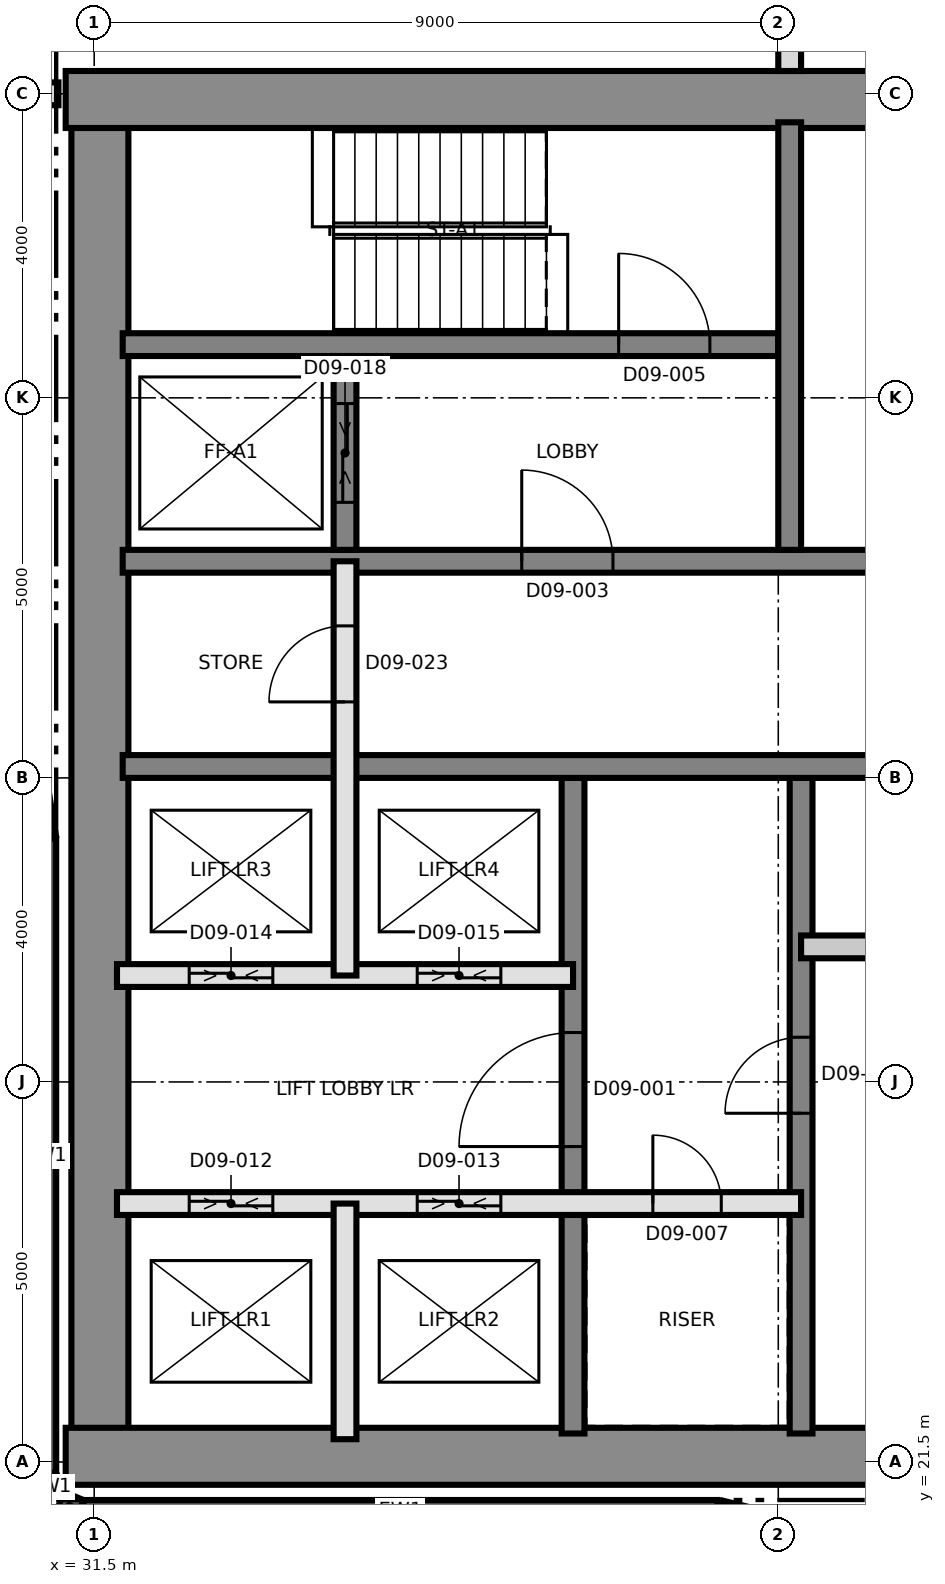
"""IFC4 building model, lengths in metres.
Left out: names, types, materials, properties, quantities, classifications, styles, units other than length and angle.
Written with IfcOpenShell. Run it as: python <this file> out.ifc"""

import sys

from ifc_helpers import new_model, si_unit, direction, frame, frame_2d, origin, place, context, subcontext, project, spatial, rectangle, extrude, element, fill, save


model = new_model("IFC4")
c1 = context("Model", 3, precision=1e-05, world=origin(), true_north=direction((0.0, 1.0)))
c2 = subcontext(c1, "Body", "Model", "MODEL_VIEW")
j1 = project(units=[si_unit("LENGTHUNIT", "METRE"), si_unit("PLANEANGLEUNIT", "RADIAN")], contexts=[c1])
p1 = place(None, origin())
s1 = spatial("IfcSite", under=j1, at=p1, CompositionType="ELEMENT")
p2 = place(p1, origin())
s2 = spatial("IfcBuilding", under=s1, at=p2, CompositionType="ELEMENT")
p3 = place(p2, frame((0.0, 0.0, 105.6)))
s3 = spatial("IfcBuildingStorey", under=s2, at=p3, CompositionType="ELEMENT", Elevation=105.6)
p4 = place(p3, frame((31.575, 21.875, 0.0), z_axis=(0.0, 0.0, 1.0), x_axis=(0.0, 1.0, 0.0)))
e1 = element("IfcWall", 1, at=p4, inside=s3, PredefinedType="SHEAR", context=c2, shape_type="SweptSolid", body=[
    extrude(rectangle(XDim=17.25, YDim=0.75, at=frame_2d((8.625, 0.0))), origin(), (0.0, 0.0, 1.0), 3.7),
])
p5 = place(p3, frame((31.125, 21.575, 0.0), z_axis=(0.0, 0.0, 1.0), x_axis=(1.0, 0.0, 0.0)))
e2 = element("IfcWall", 2, at=p5, inside=s3, PredefinedType="SHEAR", context=c2, shape_type="SweptSolid", body=[
    extrude(rectangle(XDim=27.0, YDim=0.75, at=frame_2d((13.5, 0.0))), origin(), (0.0, 0.0, 1.0), 3.7),
])
p6 = place(p3, frame((31.125, 39.425, 0.0), z_axis=(0.0, 0.0, 1.0), x_axis=(1.0, 0.0, 0.0)))
e3 = element("IfcWall", 3, at=p6, inside=s3, PredefinedType="SHEAR", context=c2, shape_type="SweptSolid", body=[
    extrude(rectangle(XDim=27.0, YDim=0.75, at=frame_2d((13.5, 0.0))), origin(), (0.0, 0.0, 1.0), 3.7),
])
p7 = place(p6, frame((10.575, 0.0, 0.0)))
e4 = element("IfcOpeningElement", 4, at=p7, cuts=e3, PredefinedType="OPENING", context=c2, shape_type="SweptSolid", body=[
    extrude(rectangle(XDim=1.2, YDim=2.1, at=frame_2d((0.6, 1.05))), frame((0.0, 0.385, 0.0), z_axis=(0.0, -1.0, 0.0), x_axis=(1.0, 0.0, 0.0)), (0.0, 0.0, 1.0), 0.77),
])
p8 = place(p3, frame((37.8, 21.875, 0.0), z_axis=(0.0, 0.0, 1.0), x_axis=(0.0, 1.0, 0.0)))
e5 = element("IfcWall", 5, at=p8, inside=s3, PredefinedType="SHEAR", context=c2, shape_type="SweptSolid", body=[
    extrude(rectangle(XDim=8.625, YDim=0.3, at=frame_2d((4.312, 0.0))), origin(), (0.0, 0.0, 1.0), 3.7),
])
p9 = place(p8, frame((3.775, 0.0, 0.0)))
e6 = element("IfcOpeningElement", 6, at=p9, cuts=e5, PredefinedType="OPENING", context=c2, shape_type="SweptSolid", body=[
    extrude(rectangle(XDim=1.5, YDim=2.1, at=frame_2d((0.75, 1.05))), frame((0.0, 0.16, 0.0), z_axis=(0.0, -1.0, 0.0), x_axis=(1.0, 0.0, 0.0)), (0.0, 0.0, 1.0), 0.32),
])
p10 = place(p3, frame((40.8, 21.875, 0.0), z_axis=(0.0, 0.0, 1.0), x_axis=(0.0, 1.0, 0.0)))
e7 = element("IfcWall", 7, at=p10, inside=s3, PredefinedType="SHEAR", context=c2, shape_type="SweptSolid", body=[
    extrude(rectangle(XDim=8.625, YDim=0.3, at=frame_2d((4.312, 0.0))), origin(), (0.0, 0.0, 1.0), 3.7),
])
p11 = place(p10, frame((4.213, 0.0, 0.0)))
e8 = element("IfcOpeningElement", 8, at=p11, cuts=e7, PredefinedType="OPENING", context=c2, shape_type="SweptSolid", body=[
    extrude(rectangle(XDim=1.0, YDim=2.1, at=frame_2d((0.5, 1.05))), frame((0.0, 0.16, 0.0), z_axis=(0.0, -1.0, 0.0), x_axis=(1.0, 0.0, 0.0)), (0.0, 0.0, 1.0), 0.32),
])
p12 = place(p3, frame((31.875, 30.65, 0.0), z_axis=(0.0, 0.0, 1.0), x_axis=(1.0, 0.0, 0.0)))
e9 = element("IfcWall", 9, at=p12, inside=s3, PredefinedType="SHEAR", context=c2, shape_type="SweptSolid", body=[
    extrude(rectangle(XDim=26.25, YDim=0.3, at=frame_2d((13.125, 0.0))), origin(), (0.0, 0.0, 1.0), 3.7),
])
p13 = place(p12, frame((24.625, 0.0, 0.0)))
e10 = element("IfcOpeningElement", 10, at=p13, cuts=e9, PredefinedType="OPENING", context=c2, shape_type="SweptSolid", body=[
    extrude(rectangle(XDim=1.0, YDim=2.1, at=frame_2d((0.5, 1.05))), frame((0.0, 0.16, 0.0), z_axis=(0.0, -1.0, 0.0), x_axis=(1.0, 0.0, 0.0)), (0.0, 0.0, 1.0), 0.32),
])
p14 = place(p12, frame((11.425, 0.0, 0.0)))
e11 = element("IfcOpeningElement", 11, at=p14, cuts=e9, PredefinedType="OPENING", context=c2, shape_type="SweptSolid", body=[
    extrude(rectangle(XDim=1.0, YDim=2.1, at=frame_2d((0.5, 1.05))), frame((0.0, 0.16, 0.0), z_axis=(0.0, -1.0, 0.0), x_axis=(1.0, 0.0, 0.0)), (0.0, 0.0, 1.0), 0.32),
])
p15 = place(p3, frame((31.875, 33.35, 0.0), z_axis=(0.0, 0.0, 1.0), x_axis=(1.0, 0.0, 0.0)))
e12 = element("IfcWall", 12, at=p15, inside=s3, PredefinedType="SHEAR", context=c2, shape_type="SweptSolid", body=[
    extrude(rectangle(XDim=26.25, YDim=0.3, at=frame_2d((13.125, 0.0))), origin(), (0.0, 0.0, 1.0), 3.7),
])
p16 = place(p15, frame((13.775, 0.0, 0.0)))
e13 = element("IfcOpeningElement", 13, at=p16, cuts=e12, PredefinedType="OPENING", context=c2, shape_type="SweptSolid", body=[
    extrude(rectangle(XDim=1.4, YDim=2.1, at=frame_2d((0.7, 1.05))), frame((0.0, 0.16, 0.0), z_axis=(0.0, -1.0, 0.0), x_axis=(1.0, 0.0, 0.0)), (0.0, 0.0, 1.0), 0.32),
])
p17 = place(p15, frame((5.25, 0.0, 0.0)))
e14 = element("IfcOpeningElement", 14, at=p17, cuts=e12, PredefinedType="OPENING", context=c2, shape_type="SweptSolid", body=[
    extrude(rectangle(XDim=1.2, YDim=2.1, at=frame_2d((0.6, 1.05))), frame((0.0, 0.16, 0.0), z_axis=(0.0, -1.0, 0.0), x_axis=(1.0, 0.0, 0.0)), (0.0, 0.0, 1.0), 0.32),
])
p18 = place(p15, frame((19.8, 0.0, 0.0)))
e15 = element("IfcOpeningElement", 15, at=p18, cuts=e12, PredefinedType="OPENING", context=c2, shape_type="SweptSolid", body=[
    extrude(rectangle(XDim=1.2, YDim=2.1, at=frame_2d((0.6, 1.05))), frame((0.0, 0.16, 0.0), z_axis=(0.0, -1.0, 0.0), x_axis=(1.0, 0.0, 0.0)), (0.0, 0.0, 1.0), 0.32),
])
p19 = place(p3, frame((31.875, 36.2, 0.0), z_axis=(0.0, 0.0, 1.0), x_axis=(1.0, 0.0, 0.0)))
e16 = element("IfcWall", 16, at=p19, inside=s3, PredefinedType="SHEAR", context=c2, shape_type="SweptSolid", body=[
    extrude(rectangle(XDim=8.625, YDim=0.3, at=frame_2d((4.312, 0.0))), origin(), (0.0, 0.0, 1.0), 3.7),
])
p20 = place(p19, frame((6.525, 0.0, 0.0)))
e17 = element("IfcOpeningElement", 17, at=p20, cuts=e16, PredefinedType="OPENING", context=c2, shape_type="SweptSolid", body=[
    extrude(rectangle(XDim=1.2, YDim=2.1, at=frame_2d((0.6, 1.05))), frame((0.0, 0.16, 0.0), z_axis=(0.0, -1.0, 0.0), x_axis=(1.0, 0.0, 0.0)), (0.0, 0.0, 1.0), 0.32),
])
p21 = place(p3, frame((40.65, 33.5, 0.0), z_axis=(0.0, 0.0, 1.0), x_axis=(0.0, 1.0, 0.0)))
e18 = element("IfcWall", 18, at=p21, inside=s3, PredefinedType="SHEAR", context=c2, shape_type="SweptSolid", body=[
    extrude(rectangle(XDim=5.625, YDim=0.3, at=frame_2d((2.812, 0.0))), origin(), (0.0, 0.0, 1.0), 3.7),
])
p22 = place(p3, frame((34.8, 33.5, 0.0), z_axis=(0.0, 0.0, 1.0), x_axis=(0.0, 1.0, 0.0)))
e19 = element("IfcWall", 19, at=p22, inside=s3, PredefinedType="SHEAR", context=c2, shape_type="SweptSolid", body=[
    extrude(rectangle(XDim=2.55, YDim=0.3, at=frame_2d((1.275, 0.0))), origin(), (0.0, 0.0, 1.0), 3.7),
])
p23 = place(p22, frame((0.625, 0.0, 0.0)))
e20 = element("IfcOpeningElement", 20, at=p23, cuts=e19, PredefinedType="OPENING", context=c2, shape_type="SweptSolid", body=[
    extrude(rectangle(XDim=1.3, YDim=2.4, at=frame_2d((0.65, 1.2))), frame((0.0, 0.16, 0.0), z_axis=(0.0, -1.0, 0.0), x_axis=(1.0, 0.0, 0.0)), (0.0, 0.0, 1.0), 0.32),
])
p24 = place(p3, frame((30.85, 29.699, 0.0), z_axis=(0.0, 0.0, 1.0), x_axis=(0.0, -1.0, 0.0)))
e21 = element("IfcWall", 21, at=p24, inside=s3, PredefinedType="SOLIDWALL", context=c2, shape_type="SweptSolid", body=[
    extrude(rectangle(XDim=8.34, YDim=0.3, at=frame_2d((4.17, 0.0))), origin(), (0.0, 0.0, 1.0), 3.4),
])
for number, where, z_axis, x_axis in (
    (22, (30.861, 21.302, 0.0), (0.0, 0.0, 1.0), (0.383, -0.924, 0.0)),
    (23, (31.048, 20.967, 0.0), (0.0, 0.0, 1.0), (0.924, -0.383, 0.0)),
):
    element("IfcWall", number, at=place(p3, frame(where, z_axis=z_axis, x_axis=x_axis)), inside=s3, PredefinedType="SOLIDWALL", context=c2, shape_type="SweptSolid", body=[
        extrude(rectangle(XDim=0.275, YDim=0.3, at=frame_2d((0.138, 0.0))), origin(), (0.0, 0.0, 1.0), 3.4),
    ])
p25 = place(p3, frame((31.36, 20.85, 0.0), z_axis=(0.0, 0.0, 1.0), x_axis=(1.0, 0.0, 0.0)))
e24 = element("IfcWall", 24, at=p25, inside=s3, PredefinedType="SOLIDWALL", context=c2, shape_type="SweptSolid", body=[
    extrude(rectangle(XDim=8.34, YDim=0.3, at=frame_2d((4.17, 0.0))), origin(), (0.0, 0.0, 1.0), 3.4),
])
p26 = place(p3, frame((39.735, 20.846, 0.0), z_axis=(0.0, 0.0, 1.0), x_axis=(0.97206095595, -0.234728562212, 0.0)))
e25 = element("IfcWall", 25, at=p26, inside=s3, PredefinedType="SOLIDWALL", context=c2, shape_type="SweptSolid", body=[
    extrude(rectangle(XDim=2.35, YDim=0.3, at=frame_2d((1.175, 0.0))), origin(), (0.0, 0.0, 1.0), 3.4),
])
p27 = place(p3, frame((30.152, 34.0, 0.0), z_axis=(0.0, 0.0, 1.0), x_axis=(0.160697303067, -0.987003736967, 0.0)))
e26 = element("IfcWall", 26, at=p27, inside=s3, PredefinedType="SOLIDWALL", context=c2, shape_type="SweptSolid", body=[
    extrude(rectangle(XDim=4.333, YDim=0.3, at=frame_2d((2.167, 0.0))), origin(), (0.0, 0.0, 1.0), 3.4),
])
p28 = place(p27, frame((0.366, 0.0, 0.9)))
e27 = element("IfcOpeningElement", 27, at=p28, cuts=e26, PredefinedType="OPENING", context=c2, shape_type="SweptSolid", body=[
    extrude(rectangle(XDim=3.6, YDim=1.7, at=frame_2d((1.8, 0.85))), frame((0.0, 0.16, 0.0), z_axis=(0.0, -1.0, 0.0), x_axis=(1.0, 0.0, 0.0)), (0.0, 0.0, 1.0), 0.32),
])
p29 = place(p3, frame((31.8, 24.9, 0.0), z_axis=(0.0, 0.0, 1.0), x_axis=(1.0, 0.0, 0.0)))
e28 = element("IfcWall", 28, at=p29, inside=s3, PredefinedType="SOLIDWALL", context=c2, shape_type="SweptSolid", body=[
    extrude(rectangle(XDim=9.0, YDim=0.3, at=frame_2d((4.5, 0.0))), origin(), (0.0, 0.0, 1.0), 3.4),
])
p30 = place(p29, frame((7.05, 0.0, 0.0)))
e29 = element("IfcOpeningElement", 29, at=p30, cuts=e28, PredefinedType="OPENING", context=c2, shape_type="SweptSolid", body=[
    extrude(rectangle(XDim=0.9, YDim=2.1, at=frame_2d((0.45, 1.05))), frame((0.0, 0.16, 0.0), z_axis=(0.0, -1.0, 0.0), x_axis=(1.0, 0.0, 0.0)), (0.0, 0.0, 1.0), 0.32),
])
p31 = place(p29, frame((0.95, 0.0, 0.0)))
e30 = element("IfcOpeningElement", 30, at=p31, cuts=e28, PredefinedType="OPENING", context=c2, shape_type="SweptSolid", body=[
    extrude(rectangle(XDim=1.1, YDim=2.4, at=frame_2d((0.55, 1.2))), frame((0.0, 0.16, 0.0), z_axis=(0.0, -1.0, 0.0), x_axis=(1.0, 0.0, 0.0)), (0.0, 0.0, 1.0), 0.32),
])
p32 = place(p29, frame((3.95, 0.0, 0.0)))
e31 = element("IfcOpeningElement", 31, at=p32, cuts=e28, PredefinedType="OPENING", context=c2, shape_type="SweptSolid", body=[
    extrude(rectangle(XDim=1.1, YDim=2.4, at=frame_2d((0.55, 1.2))), frame((0.0, 0.16, 0.0), z_axis=(0.0, -1.0, 0.0), x_axis=(1.0, 0.0, 0.0)), (0.0, 0.0, 1.0), 0.32),
])
p33 = place(p3, frame((31.8, 27.9, 0.0), z_axis=(0.0, 0.0, 1.0), x_axis=(1.0, 0.0, 0.0)))
e32 = element("IfcWall", 32, at=p33, inside=s3, PredefinedType="SOLIDWALL", context=c2, shape_type="SweptSolid", body=[
    extrude(rectangle(XDim=6.0, YDim=0.3, at=frame_2d((3.0, 0.0))), origin(), (0.0, 0.0, 1.0), 3.4),
])
p34 = place(p33, frame((0.95, 0.0, 0.0)))
e33 = element("IfcOpeningElement", 33, at=p34, cuts=e32, PredefinedType="OPENING", context=c2, shape_type="SweptSolid", body=[
    extrude(rectangle(XDim=1.1, YDim=2.4, at=frame_2d((0.55, 1.2))), frame((0.0, 0.16, 0.0), z_axis=(0.0, -1.0, 0.0), x_axis=(1.0, 0.0, 0.0)), (0.0, 0.0, 1.0), 0.32),
])
p35 = place(p33, frame((3.95, 0.0, 0.0)))
e34 = element("IfcOpeningElement", 34, at=p35, cuts=e32, PredefinedType="OPENING", context=c2, shape_type="SweptSolid", body=[
    extrude(rectangle(XDim=1.1, YDim=2.4, at=frame_2d((0.55, 1.2))), frame((0.0, 0.16, 0.0), z_axis=(0.0, -1.0, 0.0), x_axis=(1.0, 0.0, 0.0)), (0.0, 0.0, 1.0), 0.32),
])
p36 = place(p3, frame((40.8, 28.277, 0.0), z_axis=(0.0, 0.0, 1.0), x_axis=(1.0, 0.0, 0.0)))
e35 = element("IfcWall", 35, at=p36, inside=s3, PredefinedType="PARTITIONING", context=c2, shape_type="SweptSolid", body=[
    extrude(rectangle(XDim=6.0, YDim=0.3, at=frame_2d((3.0, 0.0))), origin(), (0.0, 0.0, 1.0), 3.4),
])
p37 = place(p3, frame((34.8, 21.8, 0.0), z_axis=(0.0, 0.0, 1.0), x_axis=(0.0, 1.0, 0.0)))
e36 = element("IfcWall", 36, at=p37, inside=s3, PredefinedType="SOLIDWALL", context=c2, shape_type="SweptSolid", body=[
    extrude(rectangle(XDim=3.1, YDim=0.3, at=frame_2d((1.55, 0.0))), origin(), (0.0, 0.0, 1.0), 3.4),
])
p38 = place(p3, frame((34.8, 27.9, 0.0), z_axis=(0.0, 0.0, 1.0), x_axis=(0.0, 1.0, 0.0)))
e37 = element("IfcWall", 37, at=p38, inside=s3, PredefinedType="SOLIDWALL", context=c2, shape_type="SweptSolid", body=[
    extrude(rectangle(XDim=5.45, YDim=0.3, at=frame_2d((2.725, 0.0))), origin(), (0.0, 0.0, 1.0), 3.4),
])
p39 = place(p38, frame((3.6, 0.0, 0.0)))
e38 = element("IfcOpeningElement", 38, at=p39, cuts=e37, PredefinedType="OPENING", context=c2, shape_type="SweptSolid", body=[
    extrude(rectangle(XDim=1.0, YDim=2.1, at=frame_2d((0.5, 1.05))), frame((0.0, 0.16, 0.0), z_axis=(0.0, -1.0, 0.0), x_axis=(1.0, 0.0, 0.0)), (0.0, 0.0, 1.0), 0.32),
])
p40 = place(p3, frame((30.35, 39.5, 0.0), z_axis=(0.0, 0.0, 1.0), x_axis=(1.0, 0.0, 0.0)))
e39 = element("IfcWall", 39, at=p40, inside=s3, PredefinedType="PARTITIONING", context=c2, shape_type="SweptSolid", body=[
    extrude(rectangle(XDim=0.68, YDim=0.3, at=frame_2d((0.34, 0.0))), origin(), (0.0, 0.0, 1.0), 3.4),
])
p41 = place(p3, frame((40.65, 39.8, 0.0), z_axis=(0.0, 0.0, 1.0), x_axis=(0.0, 1.0, 0.0)))
e40 = element("IfcWall", 40, at=p41, inside=s3, PredefinedType="PARTITIONING", context=c2, shape_type="SweptSolid", body=[
    extrude(rectangle(XDim=37.09, YDim=0.3, at=frame_2d((18.545, 0.0))), origin(), (0.0, 0.0, 1.0), 3.4),
])
p42 = place(p41, frame((0.835, 0.0, 0.0)))
e41 = element("IfcOpeningElement", 41, at=p42, cuts=e40, PredefinedType="OPENING", context=c2, shape_type="SweptSolid", body=[
    extrude(rectangle(XDim=1.2, YDim=2.1, at=frame_2d((0.6, 1.05))), frame((0.0, 0.16, 0.0), z_axis=(0.0, -1.0, 0.0), x_axis=(1.0, 0.0, 0.0)), (0.0, 0.0, 1.0), 0.32),
])
p43 = place(p41, frame((4.085, 0.0, 0.0)))
e42 = element("IfcOpeningElement", 42, at=p43, cuts=e40, PredefinedType="OPENING", context=c2, shape_type="SweptSolid", body=[
    extrude(rectangle(XDim=1.0, YDim=2.1, at=frame_2d((0.5, 1.05))), frame((0.0, 0.16, 0.0), z_axis=(0.0, -1.0, 0.0), x_axis=(1.0, 0.0, 0.0)), (0.0, 0.0, 1.0), 0.32),
])
p44 = place(p41, frame((11.62, 0.0, 0.0)))
e43 = element("IfcOpeningElement", 43, at=p44, cuts=e40, PredefinedType="OPENING", context=c2, shape_type="SweptSolid", body=[
    extrude(rectangle(XDim=1.0, YDim=2.4, at=frame_2d((0.5, 1.2))), frame((0.0, 0.16, 0.0), z_axis=(0.0, -1.0, 0.0), x_axis=(1.0, 0.0, 0.0)), (0.0, 0.0, 1.0), 0.32),
])
p45 = place(p41, frame((13.27, 0.0, 0.0)))
e44 = element("IfcOpeningElement", 44, at=p45, cuts=e40, PredefinedType="OPENING", context=c2, shape_type="SweptSolid", body=[
    extrude(rectangle(XDim=1.0, YDim=2.4, at=frame_2d((0.5, 1.2))), frame((0.0, 0.16, 0.0), z_axis=(0.0, -1.0, 0.0), x_axis=(1.0, 0.0, 0.0)), (0.0, 0.0, 1.0), 0.32),
])
p46 = place(p41, frame((21.2, 0.0, 0.0)))
e45 = element("IfcOpeningElement", 45, at=p46, cuts=e40, PredefinedType="OPENING", context=c2, shape_type="SweptSolid", body=[
    extrude(rectangle(XDim=1.0, YDim=2.4, at=frame_2d((0.5, 1.2))), frame((0.0, 0.16, 0.0), z_axis=(0.0, -1.0, 0.0), x_axis=(1.0, 0.0, 0.0)), (0.0, 0.0, 1.0), 0.32),
])
p47 = place(p9, origin())
e46 = element("IfcDoor", 46, at=p47, inside=s3, OperationType="SINGLE_SWING_LEFT", PredefinedType="DOOR", context=c2, shape_type="SweptSolid", body=[
    extrude(rectangle(XDim=1.5, YDim=2.1, at=frame_2d((0.75, 1.05))), frame((0.0, 0.025, 0.0), z_axis=(0.0, -1.0, 0.0), x_axis=(1.0, 0.0, 0.0)), (0.0, 0.0, 1.0), 0.05),
])
fill(e6, e46)
p48 = place(p17, origin())
e47 = element("IfcDoor", 47, at=p48, inside=s3, OperationType="SINGLE_SWING_LEFT", PredefinedType="DOOR", context=c2, shape_type="SweptSolid", body=[
    extrude(rectangle(XDim=1.2, YDim=2.1, at=frame_2d((0.6, 1.05))), frame((0.0, 0.025, 0.0), z_axis=(0.0, -1.0, 0.0), x_axis=(1.0, 0.0, 0.0)), (0.0, 0.0, 1.0), 0.05),
])
fill(e14, e47)
p49 = place(p20, origin())
e48 = element("IfcDoor", 48, at=p49, inside=s3, OperationType="SINGLE_SWING_RIGHT", PredefinedType="DOOR", context=c2, shape_type="SweptSolid", body=[
    extrude(rectangle(XDim=1.2, YDim=2.1, at=frame_2d((0.6, 1.05))), frame((0.0, 0.025, 0.0), z_axis=(0.0, -1.0, 0.0), x_axis=(1.0, 0.0, 0.0)), (0.0, 0.0, 1.0), 0.05),
])
fill(e17, e48)
p50 = place(p30, origin())
e49 = element("IfcDoor", 49, at=p50, inside=s3, OperationType="SINGLE_SWING_LEFT", PredefinedType="DOOR", context=c2, shape_type="SweptSolid", body=[
    extrude(rectangle(XDim=0.9, YDim=2.1, at=frame_2d((0.45, 1.05))), frame((0.0, 0.025, 0.0), z_axis=(0.0, -1.0, 0.0), x_axis=(1.0, 0.0, 0.0)), (0.0, 0.0, 1.0), 0.05),
])
fill(e29, e49)
p51 = place(p31, origin())
e50 = element("IfcDoor", 50, at=p51, inside=s3, OperationType="SLIDING_TO_LEFT", PredefinedType="DOOR", context=c2, shape_type="SweptSolid", body=[
    extrude(rectangle(XDim=1.1, YDim=2.4, at=frame_2d((0.55, 1.2))), frame((0.0, 0.025, 0.0), z_axis=(0.0, -1.0, 0.0), x_axis=(1.0, 0.0, 0.0)), (0.0, 0.0, 1.0), 0.05),
])
fill(e30, e50)
p52 = place(p32, origin())
e51 = element("IfcDoor", 51, at=p52, inside=s3, OperationType="SLIDING_TO_LEFT", PredefinedType="DOOR", context=c2, shape_type="SweptSolid", body=[
    extrude(rectangle(XDim=1.1, YDim=2.4, at=frame_2d((0.55, 1.2))), frame((0.0, 0.025, 0.0), z_axis=(0.0, -1.0, 0.0), x_axis=(1.0, 0.0, 0.0)), (0.0, 0.0, 1.0), 0.05),
])
fill(e31, e51)
p53 = place(p34, origin())
e52 = element("IfcDoor", 52, at=p53, inside=s3, OperationType="SLIDING_TO_LEFT", PredefinedType="DOOR", context=c2, shape_type="SweptSolid", body=[
    extrude(rectangle(XDim=1.1, YDim=2.4, at=frame_2d((0.55, 1.2))), frame((0.0, 0.025, 0.0), z_axis=(0.0, -1.0, 0.0), x_axis=(1.0, 0.0, 0.0)), (0.0, 0.0, 1.0), 0.05),
])
fill(e33, e52)
p54 = place(p35, origin())
e53 = element("IfcDoor", 53, at=p54, inside=s3, OperationType="SLIDING_TO_LEFT", PredefinedType="DOOR", context=c2, shape_type="SweptSolid", body=[
    extrude(rectangle(XDim=1.1, YDim=2.4, at=frame_2d((0.55, 1.2))), frame((0.0, 0.025, 0.0), z_axis=(0.0, -1.0, 0.0), x_axis=(1.0, 0.0, 0.0)), (0.0, 0.0, 1.0), 0.05),
])
fill(e34, e53)
p55 = place(p23, origin())
e54 = element("IfcDoor", 54, at=p55, inside=s3, OperationType="SLIDING_TO_LEFT", PredefinedType="DOOR", context=c2, shape_type="SweptSolid", body=[
    extrude(rectangle(XDim=1.3, YDim=2.4, at=frame_2d((0.65, 1.2))), frame((0.0, 0.025, 0.0), z_axis=(0.0, -1.0, 0.0), x_axis=(1.0, 0.0, 0.0)), (0.0, 0.0, 1.0), 0.05),
])
fill(e20, e54)
p56 = place(p11, origin())
e55 = element("IfcDoor", 55, at=p56, inside=s3, OperationType="SINGLE_SWING_RIGHT", PredefinedType="DOOR", context=c2, shape_type="SweptSolid", body=[
    extrude(rectangle(XDim=1.0, YDim=2.1, at=frame_2d((0.5, 1.05))), frame((0.0, 0.025, 0.0), z_axis=(0.0, -1.0, 0.0), x_axis=(1.0, 0.0, 0.0)), (0.0, 0.0, 1.0), 0.05),
])
fill(e8, e55)
p57 = place(p39, origin())
e56 = element("IfcDoor", 56, at=p57, inside=s3, OperationType="SINGLE_SWING_RIGHT", PredefinedType="DOOR", context=c2, shape_type="SweptSolid", body=[
    extrude(rectangle(XDim=1.0, YDim=2.1, at=frame_2d((0.5, 1.05))), frame((0.0, 0.025, 0.0), z_axis=(0.0, -1.0, 0.0), x_axis=(1.0, 0.0, 0.0)), (0.0, 0.0, 1.0), 0.05),
])
fill(e38, e56)
save(model, sys.argv[1])
